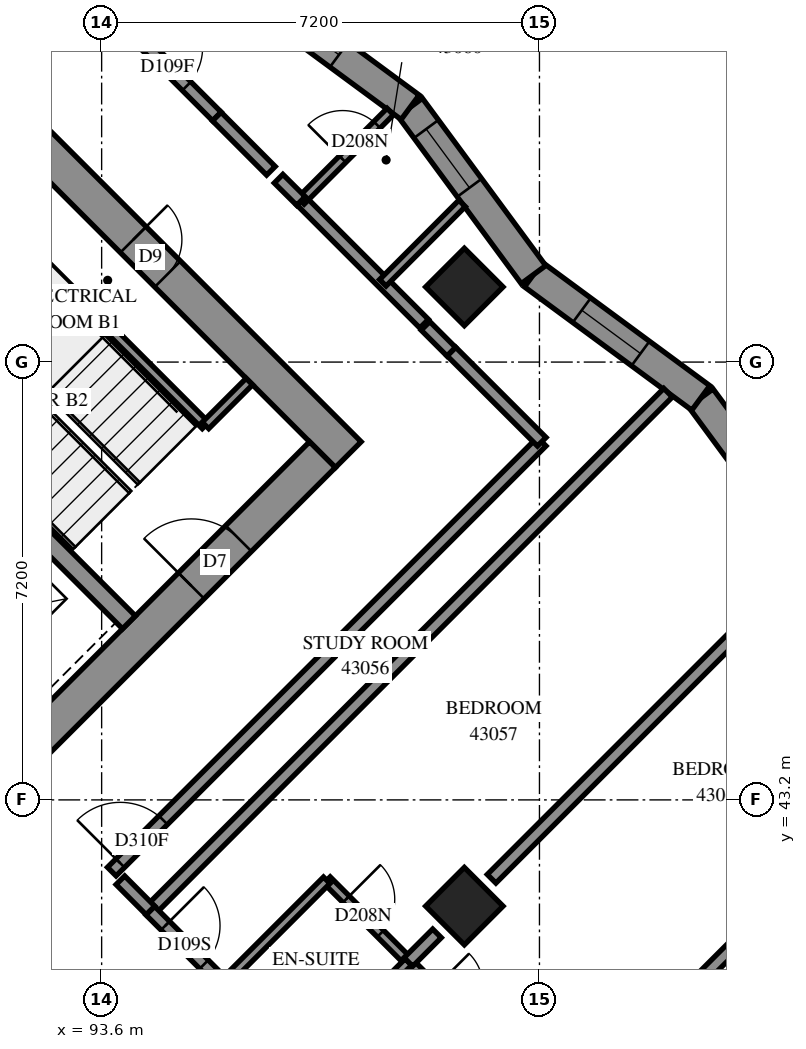
"""IFC4 building model, lengths in metres.
Left out: names, types, materials, properties, quantities, classifications, styles, units other than length and angle.
Written with IfcOpenShell. Run it as: python <this file> out.ifc"""

import sys

from ifc_helpers import new_model, si_unit, direction, frame, frame_2d, origin, origin_2d, place, context, subcontext, project, spatial, polyline, rectangle, outline, extrude, element, fill, save


model = new_model("IFC4")
c1 = context("Model", 3, precision=1e-05, world=origin(), true_north=direction((0.0, 1.0)))
c2 = subcontext(c1, "Body", "Model", "MODEL_VIEW")
j1 = project(units=[si_unit("LENGTHUNIT", "METRE"), si_unit("PLANEANGLEUNIT", "RADIAN")], contexts=[c1])
p1 = place(None, origin())
s1 = spatial("IfcSite", under=j1, at=p1, CompositionType="ELEMENT")
p2 = place(p1, origin())
s2 = spatial("IfcBuilding", under=s1, at=p2, CompositionType="ELEMENT")
p3 = place(p2, frame((0.0, 0.0, 159.2)))
s3 = spatial("IfcBuildingStorey", under=s2, at=p3, CompositionType="ELEMENT", Elevation=159.2)
for number, where, z_axis, x_axis in (
    (1, (99.565, 51.635, 0.0), (0.0, 0.0, 1.0), (0.707, -0.707, 0.0)),
    (2, (99.565, 41.453, 0.0), (0.0, 0.0, 1.0), (0.707, -0.707, 0.0)),
):
    element("IfcColumn", number, at=place(p3, frame(where, z_axis=z_axis, x_axis=x_axis)), inside=s3, PredefinedType="COLUMN", context=c2, shape_type="SweptSolid", body=[
        extrude(rectangle(XDim=0.9, YDim=0.9, at=origin_2d()), origin(), (0.0, 0.0, 1.0), 3.1),
    ])
p4 = place(p3, frame((86.625, 59.908, -0.3), z_axis=(0.0, 0.0, 1.0), x_axis=(0.7071067812, -0.7071067812, 0.0)))
e3 = element("IfcWall", 3, at=p4, inside=s3, PredefinedType="SHEAR", context=c2, shape_type="SweptSolid", body=[
    extrude(rectangle(XDim=15.6, YDim=0.6, at=frame_2d((7.8, 0.0))), origin(), (0.0, 0.0, 1.0), 2.7),
])
p5 = place(p4, frame((10.6, 0.0, 0.3)))
e4 = element("IfcOpeningElement", 4, at=p5, cuts=e3, PredefinedType="OPENING", context=c2, shape_type="SweptSolid", body=[
    extrude(rectangle(XDim=0.8, YDim=2.1, at=frame_2d((0.4, 1.05))), frame((0.0, 0.31, 0.0), z_axis=(0.0, -1.0, 0.0), x_axis=(1.0, 0.0, 0.0)), (0.0, 0.0, 1.0), 0.62),
])
p6 = place(p3, frame((87.049, 38.695, -0.3), z_axis=(0.0, 0.0, 1.0), x_axis=(0.7071067812, 0.7071067812, 0.0)))
e5 = element("IfcWall", 5, at=p6, inside=s3, PredefinedType="SHEAR", context=c2, shape_type="SweptSolid", body=[
    extrude(rectangle(XDim=14.4, YDim=0.6, at=frame_2d((7.2, 0.0))), origin(), (0.0, 0.0, 1.0), 2.7),
])
p7 = place(p6, frame((4.55, 0.0, 0.3)))
e6 = element("IfcOpeningElement", 6, at=p7, cuts=e5, PredefinedType="OPENING", context=c2, shape_type="SweptSolid", body=[
    extrude(rectangle(XDim=1.1, YDim=2.1, at=frame_2d((0.55, 1.05))), frame((0.0, 0.31, 0.0), z_axis=(0.0, -1.0, 0.0), x_axis=(1.0, 0.0, 0.0)), (0.0, 0.0, 1.0), 0.62),
])
p8 = place(p6, frame((11.35, 0.0, 0.3)))
e7 = element("IfcOpeningElement", 7, at=p8, cuts=e5, PredefinedType="OPENING", context=c2, shape_type="SweptSolid", body=[
    extrude(rectangle(XDim=1.1, YDim=2.1, at=frame_2d((0.55, 1.05))), frame((0.0, 0.31, 0.0), z_axis=(0.0, -1.0, 0.0), x_axis=(1.0, 0.0, 0.0)), (0.0, 0.0, 1.0), 0.62),
])
p9 = place(p3, frame((88.958, 51.211, 0.0), z_axis=(0.0, 0.0, 1.0), x_axis=(0.7070998367, -0.7071137256, 0.0)))
e8 = element("IfcWall", 8, at=p9, inside=s3, PredefinedType="SOLIDWALL", context=c2, shape_type="SweptSolid", body=[
    extrude(rectangle(XDim=7.2, YDim=0.3, at=frame_2d((3.6, 0.0))), origin(), (0.0, 0.0, 1.0), 3.1),
])
p10 = place(p3, frame((105.494, 47.041, 0.0), z_axis=(0.0, 0.0, 1.0), x_axis=(-0.5932158949, 0.8050434162, 0.0)))
e9 = element("IfcWall", 9, at=p10, inside=s3, PredefinedType="SOLIDWALL", context=c2, shape_type="SweptSolid", body=[
    extrude(outline(polyline([(0.06, -0.25), (3.478, -0.25), (3.402, 0.25), (-0.06, 0.25), (0.06, -0.25)])), origin(), (0.0, 0.0, 1.0), 3.1),
])
p11 = place(p10, frame((1.101, 0.0, 0.45)))
e10 = element("IfcOpeningElement", 10, at=p11, cuts=e9, PredefinedType="OPENING", context=c2, shape_type="SweptSolid", body=[
    extrude(rectangle(XDim=1.2, YDim=2.5, at=frame_2d((0.6, 1.25))), frame((0.0, 0.26, 0.0), z_axis=(0.0, -1.0, 0.0), x_axis=(1.0, 0.0, 0.0)), (0.0, 0.0, 1.0), 0.52),
])
p12 = place(p3, frame((103.454, 49.81, 0.0), z_axis=(0.0, 0.0, 1.0), x_axis=(-0.8050440725, 0.5932150043, 0.0)))
e11 = element("IfcWall", 11, at=p12, inside=s3, PredefinedType="SOLIDWALL", context=c2, shape_type="SweptSolid", body=[
    extrude(outline(polyline([(-0.038, -0.25), (3.381, -0.25), (3.456, 0.25), (0.038, 0.25), (-0.038, -0.25)])), origin(), (0.0, 0.0, 1.0), 3.1),
])
p13 = place(p12, frame((1.232, 0.0, 0.45)))
e12 = element("IfcOpeningElement", 12, at=p13, cuts=e11, PredefinedType="OPENING", context=c2, shape_type="SweptSolid", body=[
    extrude(rectangle(XDim=1.2, YDim=2.5, at=frame_2d((0.6, 1.25))), frame((0.0, 0.26, 0.0), z_axis=(0.0, -1.0, 0.0), x_axis=(1.0, 0.0, 0.0)), (0.0, 0.0, 1.0), 0.52),
])
p14 = place(p3, frame((100.702, 51.838, 0.0), z_axis=(0.0, 0.0, 1.0), x_axis=(-0.5932199928, 0.8050403966, 0.0)))
e13 = element("IfcWall", 13, at=p14, inside=s3, PredefinedType="SOLIDWALL", context=c2, shape_type="SweptSolid", body=[
    extrude(outline(polyline([(0.038, -0.25), (3.456, -0.25), (3.381, 0.25), (-0.038, 0.25), (0.038, -0.25)])), origin(), (0.0, 0.0, 1.0), 3.1),
])
p15 = place(p14, frame((1.774, 0.0, 0.45)))
e14 = element("IfcOpeningElement", 14, at=p15, cuts=e13, PredefinedType="OPENING", context=c2, shape_type="SweptSolid", body=[
    extrude(rectangle(XDim=1.2, YDim=2.5, at=frame_2d((0.6, 1.25))), frame((0.0, 0.26, 0.0), z_axis=(0.0, -1.0, 0.0), x_axis=(1.0, 0.0, 0.0)), (0.0, 0.0, 1.0), 0.52),
])
p16 = place(p3, frame((98.674, 54.59, 0.0), z_axis=(0.0, 0.0, 1.0), x_axis=(-0.8050440725, 0.5932150043, 0.0)))
e15 = element("IfcWall", 15, at=p16, inside=s3, PredefinedType="SOLIDWALL", context=c2, shape_type="SweptSolid", body=[
    extrude(outline(polyline([(-0.038, -0.25), (3.381, -0.25), (3.456, 0.25), (0.038, 0.25), (-0.038, -0.25)])), origin(), (0.0, 0.0, 1.0), 3.1),
])
p17 = place(p16, frame((1.455, 0.0, 0.45)))
e16 = element("IfcOpeningElement", 16, at=p17, cuts=e15, PredefinedType="OPENING", context=c2, shape_type="SweptSolid", body=[
    extrude(rectangle(XDim=1.2, YDim=2.5, at=frame_2d((0.6, 1.25))), frame((0.0, 0.26, 0.0), z_axis=(0.0, -1.0, 0.0), x_axis=(1.0, 0.0, 0.0)), (0.0, 0.0, 1.0), 0.52),
])
p18 = place(p3, frame((91.313, 53.354, 0.0), z_axis=(0.0, 0.0, 1.0), x_axis=(0.7071067812, -0.7071067812, 0.0)))
e17 = element("IfcWall", 17, at=p18, inside=s3, PredefinedType="PARTITIONING", context=c2, shape_type="SweptSolid", body=[
    extrude(rectangle(XDim=5.65, YDim=0.15, at=frame_2d((2.825, 0.0))), origin(), (0.0, 0.0, 1.0), 3.1),
])
p19 = place(p3, frame((95.308, 49.358, 0.0), z_axis=(0.0, 0.0, 1.0), x_axis=(0.70705776, 0.707155799, 0.0)))
e18 = element("IfcWall", 18, at=p19, inside=s3, PredefinedType="PARTITIONING", context=c2, shape_type="SweptSolid", body=[
    extrude(rectangle(XDim=1.02, YDim=0.15, at=frame_2d((0.51, 0.0))), origin(), (0.0, 0.0, 1.0), 3.1),
])
p20 = place(p3, frame((86.841, 63.093, 0.0), z_axis=(0.0, 0.0, 1.0), x_axis=(0.7071067812, -0.7071067812, 0.0)))
e19 = element("IfcWall", 19, at=p20, inside=s3, PredefinedType="PARTITIONING", context=c2, shape_type="SweptSolid", body=[
    extrude(rectangle(XDim=12.239, YDim=0.2, at=frame_2d((6.119, 0.0))), origin(), (0.0, 0.0, 1.0), 3.1),
])
p21 = place(p20, frame((10.634, 0.0, 0.0)))
e20 = element("IfcOpeningElement", 20, at=p21, cuts=e19, PredefinedType="OPENING", context=c2, shape_type="SweptSolid", body=[
    extrude(rectangle(XDim=0.9, YDim=2.1, at=frame_2d((0.45, 1.05))), frame((0.0, 0.11, 0.0), z_axis=(0.0, -1.0, 0.0), x_axis=(1.0, 0.0, 0.0)), (0.0, 0.0, 1.0), 0.22),
])
p22 = place(p3, frame((94.401, 41.383, 0.0), z_axis=(0.0, 0.0, 1.0), x_axis=(0.7071067812, 0.7071067812, 0.0)))
e21 = element("IfcWall", 21, at=p22, inside=s3, PredefinedType="PARTITIONING", context=c2, shape_type="SweptSolid", body=[
    extrude(rectangle(XDim=12.04, YDim=0.2, at=frame_2d((6.02, 0.0))), origin(), (0.0, 0.0, 1.0), 3.1),
])
p23 = place(p3, frame((92.209, 40.459, 0.0), z_axis=(0.0, 0.0, 1.0), x_axis=(0.7071067812, -0.7071067812, 0.0)))
e22 = element("IfcWall", 22, at=p23, inside=s3, PredefinedType="PARTITIONING", context=c2, shape_type="SweptSolid", body=[
    extrude(rectangle(XDim=11.698, YDim=0.2, at=frame_2d((5.849, 0.0))), origin(), (0.0, 0.0, 1.0), 3.1),
])
p24 = place(p23, frame((2.931, 0.0, 0.0)))
e23 = element("IfcOpeningElement", 23, at=p24, cuts=e22, PredefinedType="OPENING", context=c2, shape_type="SweptSolid", body=[
    extrude(rectangle(XDim=1.0, YDim=2.1, at=frame_2d((0.5, 1.05))), frame((0.0, 0.11, 0.0), z_axis=(0.0, -1.0, 0.0), x_axis=(1.0, 0.0, 0.0)), (0.0, 0.0, 1.0), 0.22),
])
p25 = place(p23, frame((10.223, 0.0, 0.0)))
e24 = element("IfcOpeningElement", 24, at=p25, cuts=e22, PredefinedType="OPENING", context=c2, shape_type="SweptSolid", body=[
    extrude(rectangle(XDim=0.9, YDim=2.1, at=frame_2d((0.45, 1.05))), frame((0.0, 0.11, 0.0), z_axis=(0.0, -1.0, 0.0), x_axis=(1.0, 0.0, 0.0)), (0.0, 0.0, 1.0), 0.22),
])
p26 = place(p3, frame((93.767, 42.021, 0.0), z_axis=(0.0, 0.0, 1.0), x_axis=(0.7071067812, 0.7071067812, 0.0)))
e25 = element("IfcWall", 25, at=p26, inside=s3, PredefinedType="PARTITIONING", context=c2, shape_type="SweptSolid", body=[
    extrude(rectangle(XDim=9.998, YDim=0.2, at=frame_2d((4.999, 0.0))), origin(), (0.0, 0.0, 1.0), 3.1),
])
p27 = place(p26, frame((0.196, 0.0, 0.0)))
e26 = element("IfcOpeningElement", 26, at=p27, cuts=e25, PredefinedType="OPENING", context=c2, shape_type="SweptSolid", body=[
    extrude(rectangle(XDim=1.0, YDim=2.1, at=frame_2d((0.5, 1.05))), frame((0.0, 0.11, 0.0), z_axis=(0.0, -1.0, 0.0), x_axis=(1.0, 0.0, 0.0)), (0.0, 0.0, 1.0), 0.22),
])
p28 = place(p3, frame((99.494, 36.292, 0.0), z_axis=(0.0, 0.0, 1.0), x_axis=(0.7071067812, 0.7071067812, 0.0)))
e27 = element("IfcWall", 27, at=p28, inside=s3, PredefinedType="PARTITIONING", context=c2, shape_type="SweptSolid", body=[
    extrude(rectangle(XDim=6.799, YDim=0.2, at=frame_2d((3.4, 0.0))), origin(), (0.0, 0.0, 1.0), 3.1),
])
p29 = place(p3, frame((100.013, 41.903, 0.0), z_axis=(0.0, 0.0, 1.0), x_axis=(0.7071067812, 0.7071067812, 0.0)))
e28 = element("IfcWall", 28, at=p29, inside=s3, PredefinedType="PARTITIONING", context=c2, shape_type="SweptSolid", body=[
    extrude(rectangle(XDim=5.928, YDim=0.2, at=frame_2d((2.964, 0.0))), origin(), (0.0, 0.0, 1.0), 3.1),
])
p30 = place(p3, frame((97.305, 41.881, 0.0), z_axis=(0.0, 0.0, 1.0), x_axis=(0.7067382634, -0.707475107, 0.0)))
e29 = element("IfcWall", 29, at=p30, inside=s3, PredefinedType="PARTITIONING", context=c2, shape_type="SweptSolid", body=[
    extrude(rectangle(XDim=3.8, YDim=0.15, at=frame_2d((1.9, 0.0))), origin(), (0.0, 0.0, 1.0), 3.1),
])
p31 = place(p30, frame((0.445, 0.0, 0.0)))
e30 = element("IfcOpeningElement", 30, at=p31, cuts=e29, PredefinedType="OPENING", context=c2, shape_type="SweptSolid", body=[
    extrude(rectangle(XDim=0.8, YDim=2.1, at=frame_2d((0.4, 1.05))), frame((0.0, 0.085, 0.0), z_axis=(0.0, -1.0, 0.0), x_axis=(1.0, 0.0, 0.0)), (0.0, 0.0, 1.0), 0.17),
])
p32 = place(p30, frame((2.507, 0.0, 0.0)))
e31 = element("IfcOpeningElement", 31, at=p32, cuts=e29, PredefinedType="OPENING", context=c2, shape_type="SweptSolid", body=[
    extrude(rectangle(XDim=0.8, YDim=2.1, at=frame_2d((0.4, 1.05))), frame((0.0, 0.085, 0.0), z_axis=(0.0, -1.0, 0.0), x_axis=(1.0, 0.0, 0.0)), (0.0, 0.0, 1.0), 0.17),
])
p33 = place(p3, frame((94.399, 41.379, 0.0), z_axis=(0.0, 0.0, 1.0), x_axis=(0.7071067812, -0.7071067812, 0.0)))
e32 = element("IfcWall", 32, at=p33, inside=s3, PredefinedType="PARTITIONING", context=c2, shape_type="SweptSolid", body=[
    extrude(rectangle(XDim=3.601, YDim=0.2, at=frame_2d((1.8, 0.0))), origin(), (0.0, 0.0, 1.0), 3.1),
])
p34 = place(p33, frame((0.35, 0.0, 0.0)))
e33 = element("IfcOpeningElement", 33, at=p34, cuts=e32, PredefinedType="OPENING", context=c2, shape_type="SweptSolid", body=[
    extrude(rectangle(XDim=0.9, YDim=2.1, at=frame_2d((0.45, 1.05))), frame((0.0, 0.11, 0.0), z_axis=(0.0, -1.0, 0.0), x_axis=(1.0, 0.0, 0.0)), (0.0, 0.0, 1.0), 0.22),
])
p35 = place(p3, frame((96.882, 53.053, 0.0), z_axis=(0.0, 0.0, 1.0), x_axis=(0.7071067812, -0.7071067812, 0.0)))
e34 = element("IfcWall", 34, at=p35, inside=s3, PredefinedType="PARTITIONING", context=c2, shape_type="SweptSolid", body=[
    extrude(rectangle(XDim=2.86, YDim=0.2, at=frame_2d((1.43, 0.0))), origin(), (0.0, 0.0, 1.0), 3.1),
])
for number, where, z_axis, x_axis in (
    (35, (95.603, 40.181, 0.0), (0.0, 0.0, 1.0), (0.707, 0.707, 0.0)),
    (36, (96.947, 38.837, 0.0), (0.0, 0.0, 1.0), (0.707, 0.707, 0.0)),
):
    element("IfcWall", number, at=place(p3, frame(where, z_axis=z_axis, x_axis=x_axis)), inside=s3, PredefinedType="PARTITIONING", context=c2, shape_type="SweptSolid", body=[
        extrude(rectangle(XDim=2.401, YDim=0.15, at=frame_2d((1.201, 0.0))), origin(), (0.0, 0.0, 1.0), 3.1),
    ])
p36 = place(p3, frame((99.352, 50.574, 0.0), z_axis=(0.0, 0.0, 1.0), x_axis=(0.7075827869, -0.7066304548, 0.0)))
e37 = element("IfcWall", 37, at=p36, inside=s3, PredefinedType="PARTITIONING", context=c2, shape_type="SweptSolid", body=[
    extrude(rectangle(XDim=2.1, YDim=0.2, at=frame_2d((1.05, 0.0))), origin(), (0.0, 0.0, 1.0), 3.1),
])
p37 = place(p3, frame((96.877, 53.051, 0.0), z_axis=(0.0, 0.0, 1.0), x_axis=(0.7071067812, 0.7071067812, 0.0)))
e38 = element("IfcWall", 38, at=p37, inside=s3, PredefinedType="PARTITIONING", context=c2, shape_type="SweptSolid", body=[
    extrude(rectangle(XDim=2.078, YDim=0.15, at=frame_2d((1.039, 0.0))), origin(), (0.0, 0.0, 1.0), 3.1),
])
p38 = place(p37, frame((0.969, 0.0, 0.0)))
e39 = element("IfcOpeningElement", 39, at=p38, cuts=e38, PredefinedType="OPENING", context=c2, shape_type="SweptSolid", body=[
    extrude(rectangle(XDim=0.8, YDim=2.1, at=frame_2d((0.4, 1.05))), frame((0.0, 0.085, 0.0), z_axis=(0.0, -1.0, 0.0), x_axis=(1.0, 0.0, 0.0)), (0.0, 0.0, 1.0), 0.17),
])
p39 = place(p3, frame((98.224, 51.704, 0.0), z_axis=(0.0, 0.0, 1.0), x_axis=(0.7065103186, 0.7077027411, 0.0)))
e40 = element("IfcWall", 40, at=p39, inside=s3, PredefinedType="PARTITIONING", context=c2, shape_type="SweptSolid", body=[
    extrude(rectangle(XDim=1.845, YDim=0.15, at=frame_2d((0.922, 0.0))), origin(), (0.0, 0.0, 1.0), 3.1),
])
p40 = place(p3, frame((95.494, 54.438, 0.0), z_axis=(0.0, 0.0, 1.0), x_axis=(0.706312726, -0.7078999456, 0.0)))
e41 = element("IfcWall", 41, at=p40, inside=s3, PredefinedType="PARTITIONING", context=c2, shape_type="SweptSolid", body=[
    extrude(rectangle(XDim=1.26, YDim=0.2, at=frame_2d((0.63, 0.0))), origin(), (0.0, 0.0, 1.0), 3.1),
])
p41 = place(p3, frame((93.909, 41.879, 0.0), z_axis=(0.0, 0.0, 1.0), x_axis=(0.7056768426, -0.7085338339, 0.0)))
e42 = element("IfcWall", 42, at=p41, inside=s3, PredefinedType="PARTITIONING", context=c2, shape_type="SweptSolid", body=[
    extrude(rectangle(XDim=0.7, YDim=0.2, at=frame_2d((0.35, 0.0))), origin(), (0.0, 0.0, 1.0), 3.1),
])
p42 = place(p3, frame((98.645, 40.535, 0.0), z_axis=(0.0, 0.0, 1.0), x_axis=(0.7071067812, 0.7071067812, 0.0)))
e43 = element("IfcWall", 43, at=p42, inside=s3, PredefinedType="PARTITIONING", context=c2, shape_type="SweptSolid", body=[
    extrude(rectangle(XDim=0.665, YDim=0.2, at=frame_2d((0.332, 0.0))), origin(), (0.0, 0.0, 1.0), 3.1),
])
p43 = place(p3, frame((98.925, 50.995, 0.0), z_axis=(0.0, 0.0, 1.0), x_axis=(0.7071067812, -0.7071067812, 0.0)))
e44 = element("IfcWall", 44, at=p43, inside=s3, PredefinedType="PARTITIONING", context=c2, shape_type="SweptSolid", body=[
    extrude(rectangle(XDim=0.6, YDim=0.2, at=frame_2d((0.3, 0.0))), origin(), (0.0, 0.0, 1.0), 3.1),
])
p44 = place(p3, frame((96.51, 53.416, 0.0), z_axis=(0.0, 0.0, 1.0), x_axis=(0.7090308706, -0.7051774419, 0.0)))
e45 = element("IfcWall", 45, at=p44, inside=s3, PredefinedType="PARTITIONING", context=c2, shape_type="SweptSolid", body=[
    extrude(rectangle(XDim=0.519, YDim=0.2, at=frame_2d((0.26, 0.0))), origin(), (0.0, 0.0, 1.0), 3.1),
])
p45 = place(p13, origin())
e46 = element("IfcWindow", 46, at=p45, inside=s3, PartitioningType="SINGLE_PANEL", PredefinedType="WINDOW", context=c2, shape_type="SweptSolid", body=[
    extrude(rectangle(XDim=1.2, YDim=2.5, at=frame_2d((0.6, 1.25))), frame((0.0, 0.18, 0.0), z_axis=(0.0, -1.0, 0.0), x_axis=(1.0, 0.0, 0.0)), (0.0, 0.0, 1.0), 0.06),
])
fill(e12, e46)
p46 = place(p15, origin())
e47 = element("IfcWindow", 47, at=p46, inside=s3, PartitioningType="SINGLE_PANEL", PredefinedType="WINDOW", context=c2, shape_type="SweptSolid", body=[
    extrude(rectangle(XDim=1.2, YDim=2.5, at=frame_2d((0.6, 1.25))), frame((0.0, 0.18, 0.0), z_axis=(0.0, -1.0, 0.0), x_axis=(1.0, 0.0, 0.0)), (0.0, 0.0, 1.0), 0.06),
])
fill(e14, e47)
p47 = place(p17, origin())
e48 = element("IfcWindow", 48, at=p47, inside=s3, PartitioningType="SINGLE_PANEL", PredefinedType="WINDOW", context=c2, shape_type="SweptSolid", body=[
    extrude(rectangle(XDim=1.2, YDim=2.5, at=frame_2d((0.6, 1.25))), frame((0.0, 0.18, 0.0), z_axis=(0.0, -1.0, 0.0), x_axis=(1.0, 0.0, 0.0)), (0.0, 0.0, 1.0), 0.06),
])
fill(e16, e48)
p48 = place(p5, origin())
e49 = element("IfcDoor", 49, at=p48, inside=s3, OperationType="SINGLE_SWING_RIGHT", PredefinedType="DOOR", context=c2, shape_type="SweptSolid", body=[
    extrude(rectangle(XDim=0.8, YDim=2.1, at=frame_2d((0.4, 1.05))), frame((0.0, 0.025, 0.0), z_axis=(0.0, -1.0, 0.0), x_axis=(1.0, 0.0, 0.0)), (0.0, 0.0, 1.0), 0.05),
])
fill(e4, e49)
p49 = place(p8, origin())
e50 = element("IfcDoor", 50, at=p49, inside=s3, OperationType="SINGLE_SWING_RIGHT", PredefinedType="DOOR", context=c2, shape_type="SweptSolid", body=[
    extrude(rectangle(XDim=1.1, YDim=2.1, at=frame_2d((0.55, 1.05))), frame((0.0, 0.025, 0.0), z_axis=(0.0, -1.0, 0.0), x_axis=(1.0, 0.0, 0.0)), (0.0, 0.0, 1.0), 0.05),
])
fill(e7, e50)
p50 = place(p27, origin())
e51 = element("IfcDoor", 51, at=p50, inside=s3, OperationType="SINGLE_SWING_LEFT", PredefinedType="DOOR", context=c2, shape_type="SweptSolid", body=[
    extrude(rectangle(XDim=1.0, YDim=2.1, at=frame_2d((0.5, 1.05))), frame((0.0, 0.025, 0.0), z_axis=(0.0, -1.0, 0.0), x_axis=(1.0, 0.0, 0.0)), (0.0, 0.0, 1.0), 0.05),
])
fill(e26, e51)
p51 = place(p34, origin())
e52 = element("IfcDoor", 52, at=p51, inside=s3, OperationType="SINGLE_SWING_RIGHT", PredefinedType="DOOR", context=c2, shape_type="SweptSolid", body=[
    extrude(rectangle(XDim=0.9, YDim=2.1, at=frame_2d((0.45, 1.05))), frame((0.0, 0.025, 0.0), z_axis=(0.0, -1.0, 0.0), x_axis=(1.0, 0.0, 0.0)), (0.0, 0.0, 1.0), 0.05),
])
fill(e33, e52)
p52 = place(p31, origin())
e53 = element("IfcDoor", 53, at=p52, inside=s3, OperationType="SINGLE_SWING_RIGHT", PredefinedType="DOOR", context=c2, shape_type="SweptSolid", body=[
    extrude(rectangle(XDim=0.8, YDim=2.1, at=frame_2d((0.4, 1.05))), frame((0.0, 0.025, 0.0), z_axis=(0.0, -1.0, 0.0), x_axis=(1.0, 0.0, 0.0)), (0.0, 0.0, 1.0), 0.05),
])
fill(e30, e53)
p53 = place(p21, origin())
e54 = element("IfcDoor", 54, at=p53, inside=s3, OperationType="SINGLE_SWING_LEFT", PredefinedType="DOOR", context=c2, shape_type="SweptSolid", body=[
    extrude(rectangle(XDim=0.9, YDim=2.1, at=frame_2d((0.45, 1.05))), frame((0.0, 0.025, 0.0), z_axis=(0.0, -1.0, 0.0), x_axis=(1.0, 0.0, 0.0)), (0.0, 0.0, 1.0), 0.05),
])
fill(e20, e54)
p54 = place(p38, origin())
e55 = element("IfcDoor", 55, at=p54, inside=s3, OperationType="SINGLE_SWING_RIGHT", PredefinedType="DOOR", context=c2, shape_type="SweptSolid", body=[
    extrude(rectangle(XDim=0.8, YDim=2.1, at=frame_2d((0.4, 1.05))), frame((0.0, 0.025, 0.0), z_axis=(0.0, -1.0, 0.0), x_axis=(1.0, 0.0, 0.0)), (0.0, 0.0, 1.0), 0.05),
])
fill(e39, e55)
save(model, sys.argv[1])
